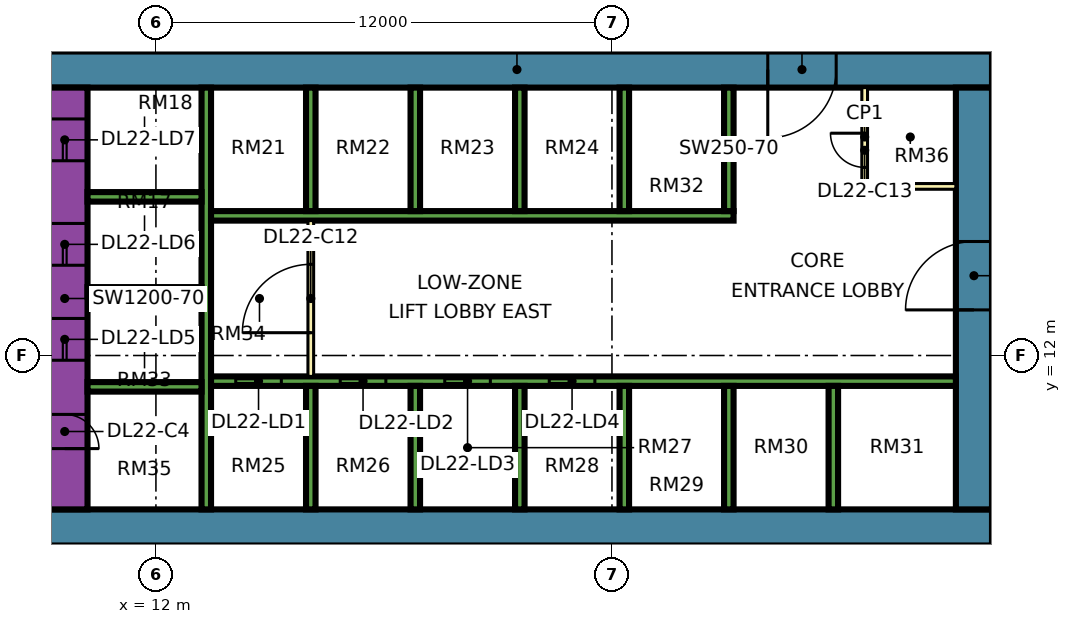
"""IFC4 building model, lengths in metres.
Left out: names, types, materials, properties, quantities, classifications, styles, units other than length and angle.
Written with IfcOpenShell. Run it as: python <this file> out.ifc"""

import sys

from ifc_helpers import new_model, si_unit, direction, frame, frame_2d, origin, place, context, subcontext, project, spatial, rectangle, extrude, element, fill, save


model = new_model("IFC4")
c1 = context("Model", 3, precision=1e-05, world=origin(), true_north=direction((0.0, 1.0)))
c2 = subcontext(c1, "Body", "Model", "MODEL_VIEW")
j1 = project(units=[si_unit("LENGTHUNIT", "METRE"), si_unit("PLANEANGLEUNIT", "RADIAN")], contexts=[c1])
p1 = place(None, origin())
s1 = spatial("IfcSite", under=j1, at=p1, CompositionType="ELEMENT")
p2 = place(p1, origin())
s2 = spatial("IfcBuilding", under=s1, at=p2, CompositionType="ELEMENT")
p3 = place(p2, frame((0.0, 0.0, 99.4)))
s3 = spatial("IfcBuildingStorey", under=s2, at=p3, CompositionType="ELEMENT", Elevation=99.4)
p4 = place(p3, frame((9.0, 7.475, 0.0), z_axis=(0.0, 0.0, 1.0), x_axis=(1.0, 0.0, 0.0)))
e1 = element("IfcWall", 1, at=p4, inside=s3, PredefinedType="SHEAR", context=c2, shape_type="SweptSolid", body=[
    extrude(rectangle(XDim=25.0, YDim=0.95, at=frame_2d((12.5, 0.0))), origin(), (0.0, 0.0, 1.0), 3.75),
])
p5 = place(p3, frame((9.0, 19.525, 0.0), z_axis=(0.0, 0.0, 1.0), x_axis=(1.0, 0.0, 0.0)))
e2 = element("IfcWall", 2, at=p5, inside=s3, PredefinedType="SHEAR", context=c2, shape_type="SweptSolid", body=[
    extrude(rectangle(XDim=25.0, YDim=0.95, at=frame_2d((12.5, 0.0))), origin(), (0.0, 0.0, 1.0), 3.75),
])
p6 = place(p5, frame((19.1, 0.0, 0.0)))
e3 = element("IfcOpeningElement", 3, at=p6, cuts=e2, PredefinedType="OPENING", context=c2, shape_type="SweptSolid", body=[
    extrude(rectangle(XDim=1.8, YDim=2.4, at=frame_2d((0.9, 1.2))), frame((0.0, 0.485, 0.0), z_axis=(0.0, -1.0, 0.0), x_axis=(1.0, 0.0, 0.0)), (0.0, 0.0, 1.0), 0.97),
])
p7 = place(p3, frame((9.6, 7.95, 0.0), z_axis=(0.0, 0.0, 1.0), x_axis=(0.0, 1.0, 0.0)))
e4 = element("IfcWall", 4, at=p7, inside=s3, PredefinedType="SHEAR", context=c2, shape_type="SweptSolid", body=[
    extrude(rectangle(XDim=11.1, YDim=1.2, at=frame_2d((5.55, 0.0))), origin(), (0.0, 0.0, 1.0), 3.75),
])
p8 = place(p7, frame((3.925, 0.0, 0.0)))
e5 = element("IfcOpeningElement", 5, at=p8, cuts=e4, PredefinedType="OPENING", context=c2, shape_type="SweptSolid", body=[
    extrude(rectangle(XDim=1.1, YDim=2.2, at=frame_2d((0.55, 1.1))), frame((0.0, 0.61, 0.0), z_axis=(0.0, -1.0, 0.0), x_axis=(1.0, 0.0, 0.0)), (0.0, 0.0, 1.0), 1.22),
])
p9 = place(p7, frame((6.425, 0.0, 0.0)))
e6 = element("IfcOpeningElement", 6, at=p9, cuts=e4, PredefinedType="OPENING", context=c2, shape_type="SweptSolid", body=[
    extrude(rectangle(XDim=1.1, YDim=2.2, at=frame_2d((0.55, 1.1))), frame((0.0, 0.61, 0.0), z_axis=(0.0, -1.0, 0.0), x_axis=(1.0, 0.0, 0.0)), (0.0, 0.0, 1.0), 1.22),
])
p10 = place(p7, frame((9.175, 0.0, 0.0)))
e7 = element("IfcOpeningElement", 7, at=p10, cuts=e4, PredefinedType="OPENING", context=c2, shape_type="SweptSolid", body=[
    extrude(rectangle(XDim=1.1, YDim=2.2, at=frame_2d((0.55, 1.1))), frame((0.0, 0.61, 0.0), z_axis=(0.0, -1.0, 0.0), x_axis=(1.0, 0.0, 0.0)), (0.0, 0.0, 1.0), 1.22),
])
p11 = place(p7, frame((1.6, 0.0, 0.0)))
e8 = element("IfcOpeningElement", 8, at=p11, cuts=e4, PredefinedType="OPENING", context=c2, shape_type="SweptSolid", body=[
    extrude(rectangle(XDim=0.9, YDim=2.1, at=frame_2d((0.45, 1.05))), frame((0.0, 0.61, 0.0), z_axis=(0.0, -1.0, 0.0), x_axis=(1.0, 0.0, 0.0)), (0.0, 0.0, 1.0), 1.22),
])
p12 = place(p3, frame((33.525, 7.95, 0.0), z_axis=(0.0, 0.0, 1.0), x_axis=(0.0, 1.0, 0.0)))
e9 = element("IfcWall", 9, at=p12, inside=s3, PredefinedType="SHEAR", context=c2, shape_type="SweptSolid", body=[
    extrude(rectangle(XDim=11.1, YDim=0.95, at=frame_2d((5.55, 0.0))), origin(), (0.0, 0.0, 1.0), 3.75),
])
p13 = place(p12, frame((5.25, 0.0, 0.0)))
e10 = element("IfcOpeningElement", 10, at=p13, cuts=e9, PredefinedType="OPENING", context=c2, shape_type="SweptSolid", body=[
    extrude(rectangle(XDim=1.8, YDim=2.4, at=frame_2d((0.9, 1.2))), frame((0.0, 0.485, 0.0), z_axis=(0.0, -1.0, 0.0), x_axis=(1.0, 0.0, 0.0)), (0.0, 0.0, 1.0), 0.97),
])
p14 = place(p3, frame((13.325, 7.95, 0.0), z_axis=(0.0, 0.0, 1.0), x_axis=(0.0, 1.0, 0.0)))
e11 = element("IfcWall", 11, at=p14, inside=s3, PredefinedType="SHEAR", context=c2, shape_type="SweptSolid", body=[
    extrude(rectangle(XDim=11.1, YDim=0.25, at=frame_2d((5.55, 0.0))), origin(), (0.0, 0.0, 1.0), 3.75),
])
p15 = place(p3, frame((13.45, 11.325, 0.0), z_axis=(0.0, 0.0, 1.0), x_axis=(1.0, 0.0, 0.0)))
e12 = element("IfcWall", 12, at=p15, inside=s3, PredefinedType="SHEAR", context=c2, shape_type="SweptSolid", body=[
    extrude(rectangle(XDim=19.6, YDim=0.25, at=frame_2d((9.8, 0.0))), origin(), (0.0, 0.0, 1.0), 3.75),
])
p16 = place(p15, frame((0.65, 0.0, 0.0)))
e13 = element("IfcOpeningElement", 13, at=p16, cuts=e12, PredefinedType="OPENING", context=c2, shape_type="SweptSolid", body=[
    extrude(rectangle(XDim=1.2, YDim=2.2, at=frame_2d((0.6, 1.1))), frame((0.0, 0.135, 0.0), z_axis=(0.0, -1.0, 0.0), x_axis=(1.0, 0.0, 0.0)), (0.0, 0.0, 1.0), 0.27),
])
p17 = place(p15, frame((3.4, 0.0, 0.0)))
e14 = element("IfcOpeningElement", 14, at=p17, cuts=e12, PredefinedType="OPENING", context=c2, shape_type="SweptSolid", body=[
    extrude(rectangle(XDim=1.2, YDim=2.2, at=frame_2d((0.6, 1.1))), frame((0.0, 0.135, 0.0), z_axis=(0.0, -1.0, 0.0), x_axis=(1.0, 0.0, 0.0)), (0.0, 0.0, 1.0), 0.27),
])
p18 = place(p15, frame((6.15, 0.0, 0.0)))
e15 = element("IfcOpeningElement", 15, at=p18, cuts=e12, PredefinedType="OPENING", context=c2, shape_type="SweptSolid", body=[
    extrude(rectangle(XDim=1.2, YDim=2.2, at=frame_2d((0.6, 1.1))), frame((0.0, 0.135, 0.0), z_axis=(0.0, -1.0, 0.0), x_axis=(1.0, 0.0, 0.0)), (0.0, 0.0, 1.0), 0.27),
])
p19 = place(p15, frame((8.9, 0.0, 0.0)))
e16 = element("IfcOpeningElement", 16, at=p19, cuts=e12, PredefinedType="OPENING", context=c2, shape_type="SweptSolid", body=[
    extrude(rectangle(XDim=1.2, YDim=2.2, at=frame_2d((0.6, 1.1))), frame((0.0, 0.135, 0.0), z_axis=(0.0, -1.0, 0.0), x_axis=(1.0, 0.0, 0.0)), (0.0, 0.0, 1.0), 0.27),
])
p20 = place(p3, frame((13.45, 15.675, 0.0), z_axis=(0.0, 0.0, 1.0), x_axis=(1.0, 0.0, 0.0)))
e17 = element("IfcWall", 17, at=p20, inside=s3, PredefinedType="SHEAR", context=c2, shape_type="SweptSolid", body=[
    extrude(rectangle(XDim=13.75, YDim=0.25, at=frame_2d((6.875, 0.0))), origin(), (0.0, 0.0, 1.0), 3.75),
])
for number, where, z_axis, x_axis in (
    (18, (10.2, 11.175, 0.0), (0.0, 0.0, 1.0), (1.0, 0.0, 0.0)),
    (19, (10.2, 13.675, 0.0), (0.0, 0.0, 1.0), (1.0, 0.0, 0.0)),
    (20, (10.2, 16.175, 0.0), (0.0, 0.0, 1.0), (1.0, 0.0, 0.0)),
):
    element("IfcWall", number, at=place(p3, frame(where, z_axis=z_axis, x_axis=x_axis)), inside=s3, PredefinedType="SHEAR", context=c2, shape_type="SweptSolid", body=[
        extrude(rectangle(XDim=3.0, YDim=0.25, at=frame_2d((1.5, 0.0))), origin(), (0.0, 0.0, 1.0), 3.75),
    ])
for number, where, z_axis, x_axis in (
    (21, (16.075, 7.95, 0.0), (0.0, 0.0, 1.0), (0.0, 1.0, 0.0)),
    (22, (18.825, 7.95, 0.0), (0.0, 0.0, 1.0), (0.0, 1.0, 0.0)),
    (23, (21.575, 7.95, 0.0), (0.0, 0.0, 1.0), (0.0, 1.0, 0.0)),
    (24, (24.325, 7.95, 0.0), (0.0, 0.0, 1.0), (0.0, 1.0, 0.0)),
    (25, (27.075, 7.95, 0.0), (0.0, 0.0, 1.0), (0.0, 1.0, 0.0)),
    (26, (29.825, 7.95, 0.0), (0.0, 0.0, 1.0), (0.0, 1.0, 0.0)),
    (27, (16.075, 15.8, 0.0), (0.0, 0.0, 1.0), (0.0, 1.0, 0.0)),
    (28, (18.825, 15.8, 0.0), (0.0, 0.0, 1.0), (0.0, 1.0, 0.0)),
    (29, (21.575, 15.8, 0.0), (0.0, 0.0, 1.0), (0.0, 1.0, 0.0)),
    (30, (24.325, 15.8, 0.0), (0.0, 0.0, 1.0), (0.0, 1.0, 0.0)),
    (31, (27.075, 15.8, 0.0), (0.0, 0.0, 1.0), (0.0, 1.0, 0.0)),
):
    element("IfcWall", number, at=place(p3, frame(where, z_axis=z_axis, x_axis=x_axis)), inside=s3, PredefinedType="SHEAR", context=c2, shape_type="SweptSolid", body=[
        extrude(rectangle(XDim=3.25, YDim=0.25, at=frame_2d((1.625, 0.0))), origin(), (0.0, 0.0, 1.0), 3.75),
    ])
p21 = place(p3, frame((-1.447, 12.553, 0.0), z_axis=(0.0, 0.0, 1.0), x_axis=(0.707106781187, -0.707106781187, 0.0)))
e32 = element("IfcWall", 32, at=p21, inside=s3, PredefinedType="SOLIDWALL", context=c2, shape_type="SweptSolid", body=[
    extrude(rectangle(XDim=19.799, YDim=0.15, at=frame_2d((9.899, 0.0))), origin(), (0.0, 0.0, 1.0), 3.35),
])
p22 = place(p21, frame((2.212, 0.0, 0.45)))
e33 = element("IfcOpeningElement", 33, at=p22, cuts=e32, PredefinedType="OPENING", context=c2, shape_type="SweptSolid", body=[
    extrude(rectangle(XDim=3.0, YDim=2.4, at=frame_2d((1.5, 1.2))), frame((0.0, 0.085, 0.0), z_axis=(0.0, -1.0, 0.0), x_axis=(1.0, 0.0, 0.0)), (0.0, 0.0, 1.0), 0.17),
])
p23 = place(p21, frame((10.216, 0.0, 0.45)))
e34 = element("IfcOpeningElement", 34, at=p23, cuts=e32, PredefinedType="OPENING", context=c2, shape_type="SweptSolid", body=[
    extrude(rectangle(XDim=3.0, YDim=2.4, at=frame_2d((1.5, 1.2))), frame((0.0, 0.085, 0.0), z_axis=(0.0, -1.0, 0.0), x_axis=(1.0, 0.0, 0.0)), (0.0, 0.0, 1.0), 0.17),
])
p24 = place(p3, frame((16.075, 11.45, 0.0), z_axis=(0.0, 0.0, 1.0), x_axis=(0.0, 1.0, 0.0)))
e35 = element("IfcWall", 35, at=p24, inside=s3, PredefinedType="PARTITIONING", context=c2, shape_type="SweptSolid", body=[
    extrude(rectangle(XDim=4.1, YDim=0.15, at=frame_2d((2.05, 0.0))), origin(), (0.0, 0.0, 1.0), 3.35),
])
p25 = place(p24, frame((1.15, 0.0, 0.0)))
e36 = element("IfcOpeningElement", 36, at=p25, cuts=e35, PredefinedType="OPENING", context=c2, shape_type="SweptSolid", body=[
    extrude(rectangle(XDim=1.8, YDim=2.4, at=frame_2d((0.9, 1.2))), frame((0.0, 0.085, 0.0), z_axis=(0.0, -1.0, 0.0), x_axis=(1.0, 0.0, 0.0)), (0.0, 0.0, 1.0), 0.17),
])
p26 = place(p3, frame((30.65, 16.45, 0.0), z_axis=(0.0, 0.0, 1.0), x_axis=(0.0, 1.0, 0.0)))
e37 = element("IfcWall", 37, at=p26, inside=s3, PredefinedType="PARTITIONING", context=c2, shape_type="SweptSolid", body=[
    extrude(rectangle(XDim=2.6, YDim=0.15, at=frame_2d((1.3, 0.0))), origin(), (0.0, 0.0, 1.0), 3.35),
])
p27 = place(p26, frame((0.5, 0.0, 0.0)))
e38 = element("IfcOpeningElement", 38, at=p27, cuts=e37, PredefinedType="OPENING", context=c2, shape_type="SweptSolid", body=[
    extrude(rectangle(XDim=0.9, YDim=2.1, at=frame_2d((0.45, 1.05))), frame((0.0, 0.085, 0.0), z_axis=(0.0, -1.0, 0.0), x_axis=(1.0, 0.0, 0.0)), (0.0, 0.0, 1.0), 0.17),
])
p28 = place(p3, frame((30.65, 16.45, 0.0), z_axis=(0.0, 0.0, 1.0), x_axis=(1.0, 0.0, 0.0)))
e39 = element("IfcWall", 39, at=p28, inside=s3, PredefinedType="PARTITIONING", context=c2, shape_type="SweptSolid", body=[
    extrude(rectangle(XDim=2.4, YDim=0.15, at=frame_2d((1.2, 0.0))), origin(), (0.0, 0.0, 1.0), 3.35),
])
p29 = place(p16, origin())
e40 = element("IfcDoor", 40, at=p29, inside=s3, OperationType="DOUBLE_DOOR_SLIDING", PredefinedType="DOOR", context=c2, shape_type="SweptSolid", body=[
    extrude(rectangle(XDim=1.2, YDim=2.2, at=frame_2d((0.6, 1.1))), frame((0.0, 0.025, 0.0), z_axis=(0.0, -1.0, 0.0), x_axis=(1.0, 0.0, 0.0)), (0.0, 0.0, 1.0), 0.05),
])
fill(e13, e40)
p30 = place(p17, origin())
e41 = element("IfcDoor", 41, at=p30, inside=s3, OperationType="DOUBLE_DOOR_SLIDING", PredefinedType="DOOR", context=c2, shape_type="SweptSolid", body=[
    extrude(rectangle(XDim=1.2, YDim=2.2, at=frame_2d((0.6, 1.1))), frame((0.0, 0.025, 0.0), z_axis=(0.0, -1.0, 0.0), x_axis=(1.0, 0.0, 0.0)), (0.0, 0.0, 1.0), 0.05),
])
fill(e14, e41)
p31 = place(p18, origin())
e42 = element("IfcDoor", 42, at=p31, inside=s3, OperationType="DOUBLE_DOOR_SLIDING", PredefinedType="DOOR", context=c2, shape_type="SweptSolid", body=[
    extrude(rectangle(XDim=1.2, YDim=2.2, at=frame_2d((0.6, 1.1))), frame((0.0, 0.025, 0.0), z_axis=(0.0, -1.0, 0.0), x_axis=(1.0, 0.0, 0.0)), (0.0, 0.0, 1.0), 0.05),
])
fill(e15, e42)
p32 = place(p19, origin())
e43 = element("IfcDoor", 43, at=p32, inside=s3, OperationType="DOUBLE_DOOR_SLIDING", PredefinedType="DOOR", context=c2, shape_type="SweptSolid", body=[
    extrude(rectangle(XDim=1.2, YDim=2.2, at=frame_2d((0.6, 1.1))), frame((0.0, 0.025, 0.0), z_axis=(0.0, -1.0, 0.0), x_axis=(1.0, 0.0, 0.0)), (0.0, 0.0, 1.0), 0.05),
])
fill(e16, e43)
p33 = place(p8, origin())
e44 = element("IfcDoor", 44, at=p33, inside=s3, OperationType="DOUBLE_DOOR_SLIDING", PredefinedType="DOOR", context=c2, shape_type="SweptSolid", body=[
    extrude(rectangle(XDim=1.1, YDim=2.2, at=frame_2d((0.55, 1.1))), frame((0.0, 0.025, 0.0), z_axis=(0.0, -1.0, 0.0), x_axis=(1.0, 0.0, 0.0)), (0.0, 0.0, 1.0), 0.05),
])
fill(e5, e44)
p34 = place(p9, origin())
e45 = element("IfcDoor", 45, at=p34, inside=s3, OperationType="DOUBLE_DOOR_SLIDING", PredefinedType="DOOR", context=c2, shape_type="SweptSolid", body=[
    extrude(rectangle(XDim=1.1, YDim=2.2, at=frame_2d((0.55, 1.1))), frame((0.0, 0.025, 0.0), z_axis=(0.0, -1.0, 0.0), x_axis=(1.0, 0.0, 0.0)), (0.0, 0.0, 1.0), 0.05),
])
fill(e6, e45)
p35 = place(p10, origin())
e46 = element("IfcDoor", 46, at=p35, inside=s3, OperationType="DOUBLE_DOOR_SLIDING", PredefinedType="DOOR", context=c2, shape_type="SweptSolid", body=[
    extrude(rectangle(XDim=1.1, YDim=2.2, at=frame_2d((0.55, 1.1))), frame((0.0, 0.025, 0.0), z_axis=(0.0, -1.0, 0.0), x_axis=(1.0, 0.0, 0.0)), (0.0, 0.0, 1.0), 0.05),
])
fill(e7, e46)
p36 = place(p13, origin())
e47 = element("IfcDoor", 47, at=p36, inside=s3, OperationType="DOUBLE_DOOR_SINGLE_SWING", PredefinedType="DOOR", context=c2, shape_type="SweptSolid", body=[
    extrude(rectangle(XDim=1.8, YDim=2.4, at=frame_2d((0.9, 1.2))), frame((0.0, 0.025, 0.0), z_axis=(0.0, -1.0, 0.0), x_axis=(1.0, 0.0, 0.0)), (0.0, 0.0, 1.0), 0.05),
])
fill(e10, e47)
p37 = place(p6, frame((1.8, 0.0, 0.0), z_axis=(0.0, 0.0, 1.0), x_axis=(-1.0, 0.0, 0.0)))
e48 = element("IfcDoor", 48, at=p37, inside=s3, OperationType="DOUBLE_DOOR_SINGLE_SWING", PredefinedType="DOOR", context=c2, shape_type="SweptSolid", body=[
    extrude(rectangle(XDim=1.8, YDim=2.4, at=frame_2d((0.9, 1.2))), frame((0.0, 0.025, 0.0), z_axis=(0.0, -1.0, 0.0), x_axis=(1.0, 0.0, 0.0)), (0.0, 0.0, 1.0), 0.05),
])
fill(e3, e48)
p38 = place(p11, frame((0.9, 0.0, 0.0), z_axis=(0.0, 0.0, 1.0), x_axis=(-1.0, 0.0, 0.0)))
e49 = element("IfcDoor", 49, at=p38, inside=s3, OperationType="SINGLE_SWING_LEFT", PredefinedType="DOOR", context=c2, shape_type="SweptSolid", body=[
    extrude(rectangle(XDim=0.9, YDim=2.1, at=frame_2d((0.45, 1.05))), frame((0.0, 0.025, 0.0), z_axis=(0.0, -1.0, 0.0), x_axis=(1.0, 0.0, 0.0)), (0.0, 0.0, 1.0), 0.05),
])
fill(e8, e49)
p39 = place(p25, origin())
e50 = element("IfcDoor", 50, at=p39, inside=s3, OperationType="DOUBLE_DOOR_SINGLE_SWING", PredefinedType="DOOR", context=c2, shape_type="SweptSolid", body=[
    extrude(rectangle(XDim=1.8, YDim=2.4, at=frame_2d((0.9, 1.2))), frame((0.0, 0.025, 0.0), z_axis=(0.0, -1.0, 0.0), x_axis=(1.0, 0.0, 0.0)), (0.0, 0.0, 1.0), 0.05),
])
fill(e36, e50)
p40 = place(p27, frame((0.9, 0.0, 0.0), z_axis=(0.0, 0.0, 1.0), x_axis=(-1.0, 0.0, 0.0)))
e51 = element("IfcDoor", 51, at=p40, inside=s3, OperationType="SINGLE_SWING_RIGHT", PredefinedType="DOOR", context=c2, shape_type="SweptSolid", body=[
    extrude(rectangle(XDim=0.9, YDim=2.1, at=frame_2d((0.45, 1.05))), frame((0.0, 0.025, 0.0), z_axis=(0.0, -1.0, 0.0), x_axis=(1.0, 0.0, 0.0)), (0.0, 0.0, 1.0), 0.05),
])
fill(e38, e51)
save(model, sys.argv[1])
